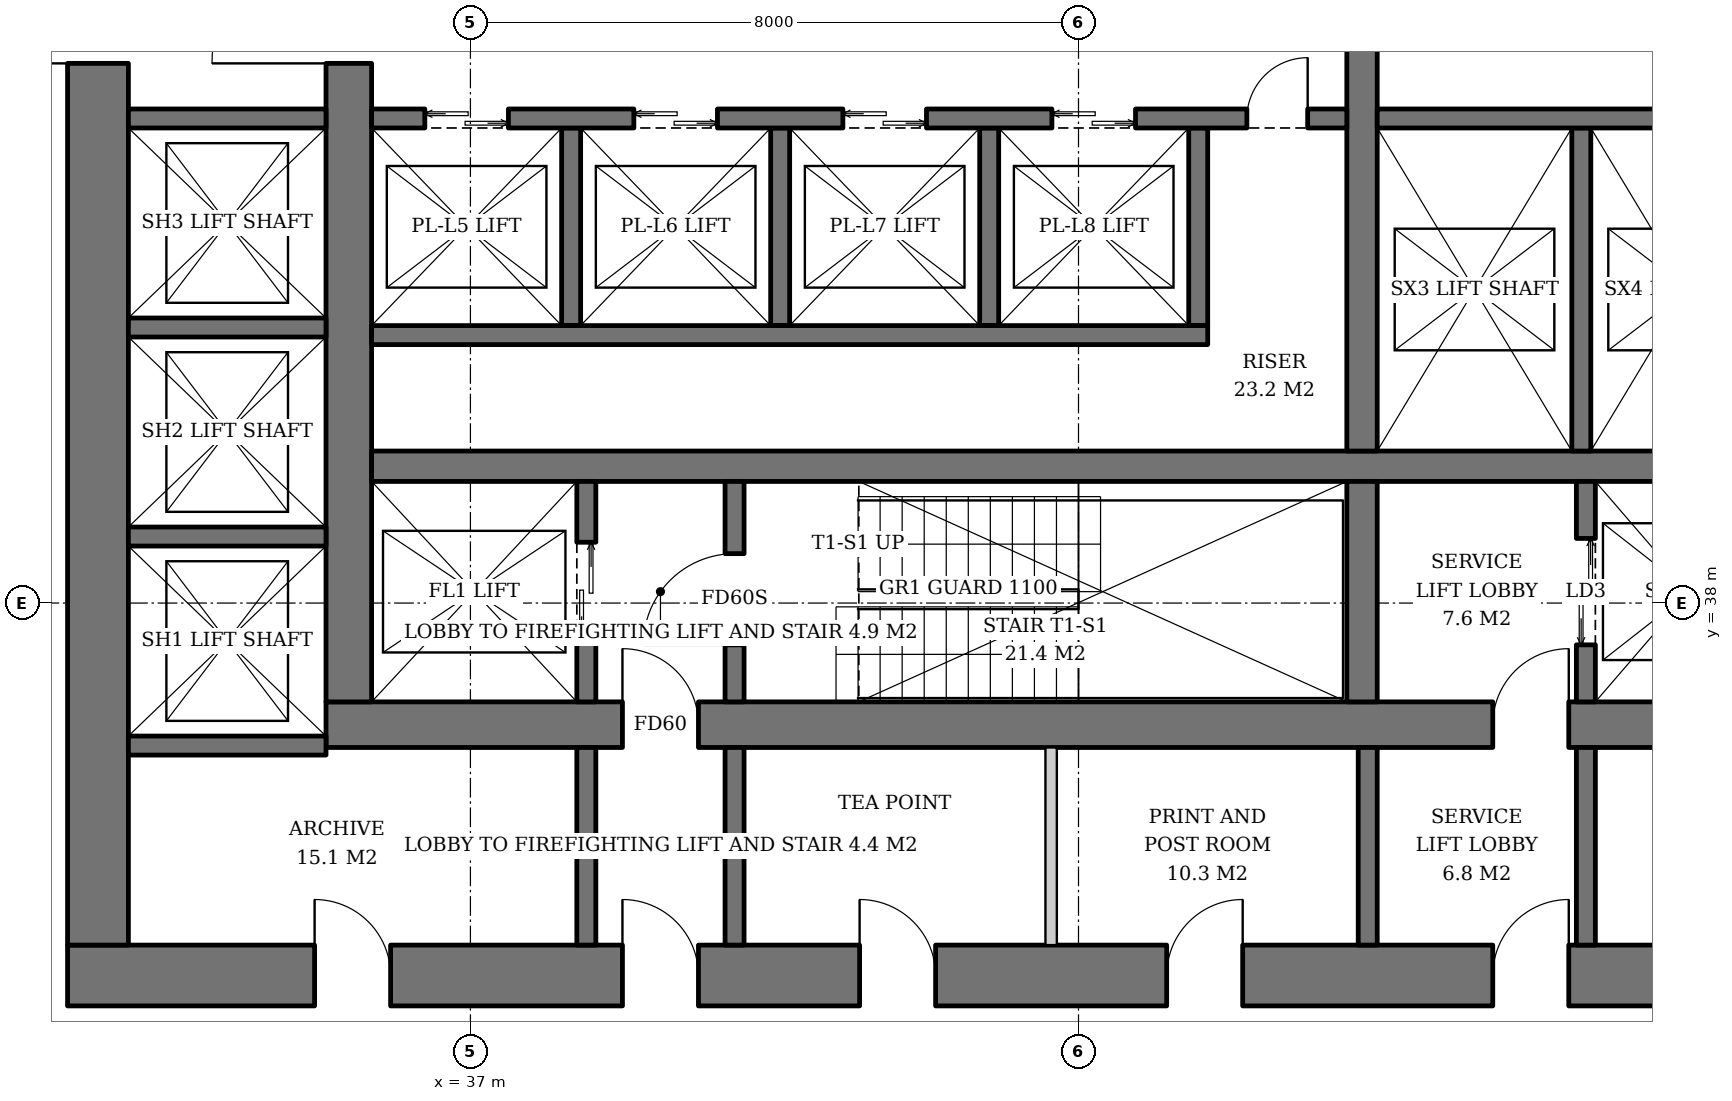
"""IFC4 building model, lengths in metres.
Left out: names, types, materials, properties, quantities, classifications, styles, units other than length and angle.
Written with IfcOpenShell. Run it as: python <this file> out.ifc"""

import sys

from ifc_helpers import new_model, si_unit, direction, frame, frame_2d, origin, place, context, subcontext, project, spatial, rectangle, extrude, element, fill, save


model = new_model("IFC4")
c1 = context("Model", 3, precision=1e-05, world=origin(), true_north=direction((0.0, 1.0)))
c2 = subcontext(c1, "Body", "Model", "MODEL_VIEW")
j1 = project(units=[si_unit("LENGTHUNIT", "METRE"), si_unit("PLANEANGLEUNIT", "RADIAN")], contexts=[c1])
p1 = place(None, origin())
s1 = spatial("IfcSite", under=j1, at=p1, CompositionType="ELEMENT")
p2 = place(p1, origin())
s2 = spatial("IfcBuilding", under=s1, at=p2, CompositionType="ELEMENT")
p3 = place(p2, frame((0.0, 0.0, 59.0)))
s3 = spatial("IfcBuildingStorey", under=s2, at=p3, CompositionType="ELEMENT", Elevation=59.0)
p4 = place(p3, frame((35.1, 36.4, 0.0), z_axis=(0.0, 0.0, 1.0), x_axis=(1.0, 0.0, 0.0)))
e1 = element("IfcWall", 1, at=p4, inside=s3, PredefinedType="SHEAR", context=c2, shape_type="SweptSolid", body=[
    extrude(rectangle(XDim=19.8, YDim=0.6, at=frame_2d((9.9, 0.0))), origin(), (0.0, 0.0, 1.0), 3.8),
])
p5 = place(p4, frame((3.9, 0.0, 0.0)))
e2 = element("IfcOpeningElement", 2, at=p5, cuts=e1, PredefinedType="OPENING", context=c2, shape_type="SweptSolid", body=[
    extrude(rectangle(XDim=1.0, YDim=2.1, at=frame_2d((0.5, 1.05))), frame((0.0, 0.31, 0.0), z_axis=(0.0, -1.0, 0.0), x_axis=(1.0, 0.0, 0.0)), (0.0, 0.0, 1.0), 0.62),
])
p6 = place(p4, frame((15.35, 0.0, 0.0)))
e3 = element("IfcOpeningElement", 3, at=p6, cuts=e1, PredefinedType="OPENING", context=c2, shape_type="SweptSolid", body=[
    extrude(rectangle(XDim=1.0, YDim=2.1, at=frame_2d((0.5, 1.05))), frame((0.0, 0.31, 0.0), z_axis=(0.0, -1.0, 0.0), x_axis=(1.0, 0.0, 0.0)), (0.0, 0.0, 1.0), 0.62),
])
p7 = place(p3, frame((35.4, 36.7, 0.0), z_axis=(0.0, 0.0, 1.0), x_axis=(0.0, 1.0, 0.0)))
e4 = element("IfcWall", 4, at=p7, inside=s3, PredefinedType="SHEAR", context=c2, shape_type="SweptSolid", body=[
    extrude(rectangle(XDim=18.6, YDim=0.6, at=frame_2d((9.3, 0.0))), origin(), (0.0, 0.0, 1.0), 3.8),
])
p8 = place(p7, frame((8.4, 0.0, 0.0)))
e5 = element("IfcOpeningElement", 5, at=p8, cuts=e4, PredefinedType="OPENING", context=c2, shape_type="SweptSolid", body=[
    extrude(rectangle(XDim=1.8, YDim=2.4, at=frame_2d((0.9, 1.2))), frame((0.0, 0.31, 0.0), z_axis=(0.0, -1.0, 0.0), x_axis=(1.0, 0.0, 0.0)), (0.0, 0.0, 1.0), 0.62),
])
p9 = place(p3, frame((31.7, 33.1, 0.0), z_axis=(0.0, 0.0, 1.0), x_axis=(1.0, 0.0, 0.0)))
e6 = element("IfcWall", 6, at=p9, inside=s3, PredefinedType="SHEAR", context=c2, shape_type="SweptSolid", body=[
    extrude(rectangle(XDim=26.6, YDim=0.8, at=frame_2d((13.3, 0.0))), origin(), (0.0, 0.0, 1.0), 3.8),
])
p10 = place(p9, frame((7.3, 0.0, 0.0)))
e7 = element("IfcOpeningElement", 7, at=p10, cuts=e6, PredefinedType="OPENING", context=c2, shape_type="SweptSolid", body=[
    extrude(rectangle(XDim=1.0, YDim=2.1, at=frame_2d((0.5, 1.05))), frame((0.0, 0.41, 0.0), z_axis=(0.0, -1.0, 0.0), x_axis=(1.0, 0.0, 0.0)), (0.0, 0.0, 1.0), 0.82),
])
p11 = place(p9, frame((18.75, 0.0, 0.0)))
e8 = element("IfcOpeningElement", 8, at=p11, cuts=e6, PredefinedType="OPENING", context=c2, shape_type="SweptSolid", body=[
    extrude(rectangle(XDim=1.0, YDim=2.1, at=frame_2d((0.5, 1.05))), frame((0.0, 0.41, 0.0), z_axis=(0.0, -1.0, 0.0), x_axis=(1.0, 0.0, 0.0)), (0.0, 0.0, 1.0), 0.82),
])
p12 = place(p9, frame((3.25, 0.0, 0.0)))
e9 = element("IfcOpeningElement", 9, at=p12, cuts=e6, PredefinedType="OPENING", context=c2, shape_type="SweptSolid", body=[
    extrude(rectangle(XDim=1.0, YDim=2.1, at=frame_2d((0.5, 1.05))), frame((0.0, 0.41, 0.0), z_axis=(0.0, -1.0, 0.0), x_axis=(1.0, 0.0, 0.0)), (0.0, 0.0, 1.0), 0.82),
])
p13 = place(p9, frame((10.42, 0.0, 0.0)))
e10 = element("IfcOpeningElement", 10, at=p13, cuts=e6, PredefinedType="OPENING", context=c2, shape_type="SweptSolid", body=[
    extrude(rectangle(XDim=1.0, YDim=2.1, at=frame_2d((0.5, 1.05))), frame((0.0, 0.41, 0.0), z_axis=(0.0, -1.0, 0.0), x_axis=(1.0, 0.0, 0.0)), (0.0, 0.0, 1.0), 0.82),
])
p14 = place(p9, frame((14.46, 0.0, 0.0)))
e11 = element("IfcOpeningElement", 11, at=p14, cuts=e6, PredefinedType="OPENING", context=c2, shape_type="SweptSolid", body=[
    extrude(rectangle(XDim=1.0, YDim=2.1, at=frame_2d((0.5, 1.05))), frame((0.0, 0.41, 0.0), z_axis=(0.0, -1.0, 0.0), x_axis=(1.0, 0.0, 0.0)), (0.0, 0.0, 1.0), 0.82),
])
p15 = place(p9, frame((22.45, 0.0, 0.0)))
e12 = element("IfcOpeningElement", 12, at=p15, cuts=e6, PredefinedType="OPENING", context=c2, shape_type="SweptSolid", body=[
    extrude(rectangle(XDim=1.0, YDim=2.1, at=frame_2d((0.5, 1.05))), frame((0.0, 0.41, 0.0), z_axis=(0.0, -1.0, 0.0), x_axis=(1.0, 0.0, 0.0)), (0.0, 0.0, 1.0), 0.82),
])
p16 = place(p3, frame((32.1, 33.5, 0.0), z_axis=(0.0, 0.0, 1.0), x_axis=(0.0, 1.0, 0.0)))
e13 = element("IfcWall", 13, at=p16, inside=s3, PredefinedType="SHEAR", context=c2, shape_type="SweptSolid", body=[
    extrude(rectangle(XDim=25.0, YDim=0.8, at=frame_2d((12.5, 0.0))), origin(), (0.0, 0.0, 1.0), 3.8),
])
p17 = place(p16, frame((11.6, 0.0, 0.0)))
e14 = element("IfcOpeningElement", 14, at=p17, cuts=e13, PredefinedType="OPENING", context=c2, shape_type="SweptSolid", body=[
    extrude(rectangle(XDim=1.8, YDim=2.4, at=frame_2d((0.9, 1.2))), frame((0.0, 0.41, 0.0), z_axis=(0.0, -1.0, 0.0), x_axis=(1.0, 0.0, 0.0)), (0.0, 0.0, 1.0), 0.82),
])
p18 = place(p3, frame((35.7, 39.8, 0.0), z_axis=(0.0, 0.0, 1.0), x_axis=(1.0, 0.0, 0.0)))
e15 = element("IfcWall", 15, at=p18, inside=s3, PredefinedType="SHEAR", context=c2, shape_type="SweptSolid", body=[
    extrude(rectangle(XDim=18.6, YDim=0.4, at=frame_2d((9.3, 0.0))), origin(), (0.0, 0.0, 1.0), 3.8),
])
p19 = place(p3, frame((48.73, 36.7, 0.0), z_axis=(0.0, 0.0, 1.0), x_axis=(0.0, 1.0, 0.0)))
e16 = element("IfcWall", 16, at=p19, inside=s3, PredefinedType="SHEAR", context=c2, shape_type="SweptSolid", body=[
    extrude(rectangle(XDim=2.9, YDim=0.4, at=frame_2d((1.45, 0.0))), origin(), (0.0, 0.0, 1.0), 3.8),
])
p20 = place(p3, frame((48.73, 40.0, 0.0), z_axis=(0.0, 0.0, 1.0), x_axis=(0.0, 1.0, 0.0)))
e17 = element("IfcWall", 17, at=p20, inside=s3, PredefinedType="SHEAR", context=c2, shape_type="SweptSolid", body=[
    extrude(rectangle(XDim=12.0, YDim=0.4, at=frame_2d((6.0, 0.0))), origin(), (0.0, 0.0, 1.0), 3.8),
])
p21 = place(p3, frame((38.525, 36.7, 0.0), z_axis=(0.0, 0.0, 1.0), x_axis=(0.0, 1.0, 0.0)))
e18 = element("IfcWall", 18, at=p21, inside=s3, PredefinedType="SHEAR", context=c2, shape_type="SweptSolid", body=[
    extrude(rectangle(XDim=2.9, YDim=0.25, at=frame_2d((1.45, 0.0))), origin(), (0.0, 0.0, 1.0), 3.8),
])
p22 = place(p21, frame((0.8, 0.0, 0.0)))
e19 = element("IfcOpeningElement", 19, at=p22, cuts=e18, PredefinedType="OPENING", context=c2, shape_type="SweptSolid", body=[
    extrude(rectangle(XDim=1.3, YDim=2.2, at=frame_2d((0.65, 1.1))), frame((0.0, 0.135, 0.0), z_axis=(0.0, -1.0, 0.0), x_axis=(1.0, 0.0, 0.0)), (0.0, 0.0, 1.0), 0.27),
])
p23 = place(p3, frame((40.475, 36.7, 0.0), z_axis=(0.0, 0.0, 1.0), x_axis=(0.0, 1.0, 0.0)))
e20 = element("IfcWall", 20, at=p23, inside=s3, PredefinedType="SHEAR", context=c2, shape_type="SweptSolid", body=[
    extrude(rectangle(XDim=2.9, YDim=0.25, at=frame_2d((1.45, 0.0))), origin(), (0.0, 0.0, 1.0), 3.8),
])
p24 = place(p23, frame((0.75, 0.0, 0.0)))
e21 = element("IfcOpeningElement", 21, at=p24, cuts=e20, PredefinedType="OPENING", context=c2, shape_type="SweptSolid", body=[
    extrude(rectangle(XDim=1.2, YDim=2.1, at=frame_2d((0.6, 1.05))), frame((0.0, 0.135, 0.0), z_axis=(0.0, -1.0, 0.0), x_axis=(1.0, 0.0, 0.0)), (0.0, 0.0, 1.0), 0.27),
])
p25 = place(p3, frame((51.675, 36.7, 0.0), z_axis=(0.0, 0.0, 1.0), x_axis=(0.0, 1.0, 0.0)))
e22 = element("IfcWall", 22, at=p25, inside=s3, PredefinedType="SHEAR", context=c2, shape_type="SweptSolid", body=[
    extrude(rectangle(XDim=2.9, YDim=0.25, at=frame_2d((1.45, 0.0))), origin(), (0.0, 0.0, 1.0), 3.8),
])
p26 = place(p25, frame((0.75, 0.0, 0.0)))
e23 = element("IfcOpeningElement", 23, at=p26, cuts=e22, PredefinedType="OPENING", context=c2, shape_type="SweptSolid", body=[
    extrude(rectangle(XDim=1.4, YDim=2.4, at=frame_2d((0.7, 1.2))), frame((0.0, 0.135, 0.0), z_axis=(0.0, -1.0, 0.0), x_axis=(1.0, 0.0, 0.0)), (0.0, 0.0, 1.0), 0.27),
])
for number, where, z_axis, x_axis in (
    (24, (38.325, 44.25, 0.0), (0.0, 0.0, 1.0), (0.0, -1.0, 0.0)),
    (25, (41.075, 44.25, 0.0), (0.0, 0.0, 1.0), (0.0, -1.0, 0.0)),
    (26, (43.825, 44.25, 0.0), (0.0, 0.0, 1.0), (0.0, -1.0, 0.0)),
    (27, (46.575, 44.25, 0.0), (0.0, 0.0, 1.0), (0.0, -1.0, 0.0)),
):
    element("IfcWall", number, at=place(p3, frame(where, z_axis=z_axis, x_axis=x_axis)), inside=s3, PredefinedType="SHEAR", context=c2, shape_type="SweptSolid", body=[
        extrude(rectangle(XDim=2.6, YDim=0.25, at=frame_2d((1.3, 0.0))), origin(), (0.0, 0.0, 1.0), 3.8),
    ])
p27 = place(p3, frame((35.7, 41.525, 0.0), z_axis=(0.0, 0.0, 1.0), x_axis=(1.0, 0.0, 0.0)))
e28 = element("IfcWall", 28, at=p27, inside=s3, PredefinedType="SHEAR", context=c2, shape_type="SweptSolid", body=[
    extrude(rectangle(XDim=11.0, YDim=0.25, at=frame_2d((5.5, 0.0))), origin(), (0.0, 0.0, 1.0), 3.8),
])
p28 = place(p3, frame((35.7, 44.375, 0.0), z_axis=(0.0, 0.0, 1.0), x_axis=(1.0, 0.0, 0.0)))
e29 = element("IfcWall", 29, at=p28, inside=s3, PredefinedType="SHEAR", context=c2, shape_type="SweptSolid", body=[
    extrude(rectangle(XDim=12.83, YDim=0.25, at=frame_2d((6.415, 0.0))), origin(), (0.0, 0.0, 1.0), 3.8),
])
p29 = place(p28, frame((0.7, 0.0, 0.0)))
e30 = element("IfcOpeningElement", 30, at=p29, cuts=e29, PredefinedType="OPENING", context=c2, shape_type="SweptSolid", body=[
    extrude(rectangle(XDim=1.1, YDim=2.2, at=frame_2d((0.55, 1.1))), frame((0.0, 0.135, 0.0), z_axis=(0.0, -1.0, 0.0), x_axis=(1.0, 0.0, 0.0)), (0.0, 0.0, 1.0), 0.27),
])
p30 = place(p28, frame((3.45, 0.0, 0.0)))
e31 = element("IfcOpeningElement", 31, at=p30, cuts=e29, PredefinedType="OPENING", context=c2, shape_type="SweptSolid", body=[
    extrude(rectangle(XDim=1.1, YDim=2.2, at=frame_2d((0.55, 1.1))), frame((0.0, 0.135, 0.0), z_axis=(0.0, -1.0, 0.0), x_axis=(1.0, 0.0, 0.0)), (0.0, 0.0, 1.0), 0.27),
])
p31 = place(p28, frame((6.2, 0.0, 0.0)))
e32 = element("IfcOpeningElement", 32, at=p31, cuts=e29, PredefinedType="OPENING", context=c2, shape_type="SweptSolid", body=[
    extrude(rectangle(XDim=1.1, YDim=2.2, at=frame_2d((0.55, 1.1))), frame((0.0, 0.135, 0.0), z_axis=(0.0, -1.0, 0.0), x_axis=(1.0, 0.0, 0.0)), (0.0, 0.0, 1.0), 0.27),
])
p32 = place(p28, frame((8.95, 0.0, 0.0)))
e33 = element("IfcOpeningElement", 33, at=p32, cuts=e29, PredefinedType="OPENING", context=c2, shape_type="SweptSolid", body=[
    extrude(rectangle(XDim=1.1, YDim=2.2, at=frame_2d((0.55, 1.1))), frame((0.0, 0.135, 0.0), z_axis=(0.0, -1.0, 0.0), x_axis=(1.0, 0.0, 0.0)), (0.0, 0.0, 1.0), 0.27),
])
p33 = place(p28, frame((11.515, 0.0, 0.0)))
e34 = element("IfcOpeningElement", 34, at=p33, cuts=e29, PredefinedType="OPENING", context=c2, shape_type="SweptSolid", body=[
    extrude(rectangle(XDim=0.8, YDim=2.0, at=frame_2d((0.4, 1.0))), frame((0.0, 0.135, 0.0), z_axis=(0.0, -1.0, 0.0), x_axis=(1.0, 0.0, 0.0)), (0.0, 0.0, 1.0), 0.27),
])
p34 = place(p3, frame((51.615, 44.25, 0.0), z_axis=(0.0, 0.0, 1.0), x_axis=(0.0, -1.0, 0.0)))
e35 = element("IfcWall", 35, at=p34, inside=s3, PredefinedType="SHEAR", context=c2, shape_type="SweptSolid", body=[
    extrude(rectangle(XDim=4.25, YDim=0.25, at=frame_2d((2.125, 0.0))), origin(), (0.0, 0.0, 1.0), 3.8),
])
p35 = place(p3, frame((48.93, 44.375, 0.0), z_axis=(0.0, 0.0, 1.0), x_axis=(1.0, 0.0, 0.0)))
e36 = element("IfcWall", 36, at=p35, inside=s3, PredefinedType="SHEAR", context=c2, shape_type="SweptSolid", body=[
    extrude(rectangle(XDim=5.37, YDim=0.25, at=frame_2d((2.685, 0.0))), origin(), (0.0, 0.0, 1.0), 3.8),
])
for number, where, z_axis, x_axis in (
    (37, (32.5, 36.125, 0.0), (0.0, 0.0, 1.0), (1.0, 0.0, 0.0)),
    (38, (32.5, 38.875, 0.0), (0.0, 0.0, 1.0), (1.0, 0.0, 0.0)),
    (39, (32.5, 41.625, 0.0), (0.0, 0.0, 1.0), (1.0, 0.0, 0.0)),
    (40, (32.5, 44.375, 0.0), (0.0, 0.0, 1.0), (1.0, 0.0, 0.0)),
):
    element("IfcWall", number, at=place(p3, frame(where, z_axis=z_axis, x_axis=x_axis)), inside=s3, PredefinedType="SHEAR", context=c2, shape_type="SweptSolid", body=[
        extrude(rectangle(XDim=2.6, YDim=0.25, at=frame_2d((1.3, 0.0))), origin(), (0.0, 0.0, 1.0), 3.8),
    ])
for number, where, z_axis, x_axis in (
    (41, (38.525, 33.5, 0.0), (0.0, 0.0, 1.0), (0.0, 1.0, 0.0)),
    (42, (40.475, 33.5, 0.0), (0.0, 0.0, 1.0), (0.0, 1.0, 0.0)),
    (43, (48.805, 33.5, 0.0), (0.0, 0.0, 1.0), (0.0, 1.0, 0.0)),
    (44, (51.675, 33.5, 0.0), (0.0, 0.0, 1.0), (0.0, 1.0, 0.0)),
):
    element("IfcWall", number, at=place(p3, frame(where, z_axis=z_axis, x_axis=x_axis)), inside=s3, PredefinedType="SOLIDWALL", context=c2, shape_type="SweptSolid", body=[
        extrude(rectangle(XDim=2.6, YDim=0.25, at=frame_2d((1.3, 0.0))), origin(), (0.0, 0.0, 1.0), 3.62),
    ])
p36 = place(p3, frame((44.64, 33.5, 0.0), z_axis=(0.0, 0.0, 1.0), x_axis=(0.0, 1.0, 0.0)))
e45 = element("IfcWall", 45, at=p36, inside=s3, PredefinedType="SOLIDWALL", context=c2, shape_type="SweptSolid", body=[
    extrude(rectangle(XDim=2.6, YDim=0.15, at=frame_2d((1.3, 0.0))), origin(), (0.0, 0.0, 1.0), 3.62),
])
p37 = place(p22, origin())
e46 = element("IfcDoor", 46, at=p37, inside=s3, OperationType="DOUBLE_DOOR_SLIDING", PredefinedType="DOOR", context=c2, shape_type="SweptSolid", body=[
    extrude(rectangle(XDim=1.3, YDim=2.2, at=frame_2d((0.65, 1.1))), frame((0.0, 0.025, 0.0), z_axis=(0.0, -1.0, 0.0), x_axis=(1.0, 0.0, 0.0)), (0.0, 0.0, 1.0), 0.05),
])
fill(e19, e46)
p38 = place(p24, origin())
e47 = element("IfcDoor", 47, at=p38, inside=s3, OperationType="SINGLE_SWING_LEFT", PredefinedType="DOOR", context=c2, shape_type="SweptSolid", body=[
    extrude(rectangle(XDim=1.2, YDim=2.1, at=frame_2d((0.6, 1.05))), frame((0.0, 0.025, 0.0), z_axis=(0.0, -1.0, 0.0), x_axis=(1.0, 0.0, 0.0)), (0.0, 0.0, 1.0), 0.05),
])
fill(e21, e47)
p39 = place(p26, origin())
e48 = element("IfcDoor", 48, at=p39, inside=s3, OperationType="DOUBLE_DOOR_SLIDING", PredefinedType="DOOR", context=c2, shape_type="SweptSolid", body=[
    extrude(rectangle(XDim=1.4, YDim=2.4, at=frame_2d((0.7, 1.2))), frame((0.0, 0.025, 0.0), z_axis=(0.0, -1.0, 0.0), x_axis=(1.0, 0.0, 0.0)), (0.0, 0.0, 1.0), 0.05),
])
fill(e23, e48)
p40 = place(p29, origin())
e49 = element("IfcDoor", 49, at=p40, inside=s3, OperationType="DOUBLE_DOOR_SLIDING", PredefinedType="DOOR", context=c2, shape_type="SweptSolid", body=[
    extrude(rectangle(XDim=1.1, YDim=2.2, at=frame_2d((0.55, 1.1))), frame((0.0, 0.025, 0.0), z_axis=(0.0, -1.0, 0.0), x_axis=(1.0, 0.0, 0.0)), (0.0, 0.0, 1.0), 0.05),
])
fill(e30, e49)
p41 = place(p30, origin())
e50 = element("IfcDoor", 50, at=p41, inside=s3, OperationType="DOUBLE_DOOR_SLIDING", PredefinedType="DOOR", context=c2, shape_type="SweptSolid", body=[
    extrude(rectangle(XDim=1.1, YDim=2.2, at=frame_2d((0.55, 1.1))), frame((0.0, 0.025, 0.0), z_axis=(0.0, -1.0, 0.0), x_axis=(1.0, 0.0, 0.0)), (0.0, 0.0, 1.0), 0.05),
])
fill(e31, e50)
p42 = place(p31, origin())
e51 = element("IfcDoor", 51, at=p42, inside=s3, OperationType="DOUBLE_DOOR_SLIDING", PredefinedType="DOOR", context=c2, shape_type="SweptSolid", body=[
    extrude(rectangle(XDim=1.1, YDim=2.2, at=frame_2d((0.55, 1.1))), frame((0.0, 0.025, 0.0), z_axis=(0.0, -1.0, 0.0), x_axis=(1.0, 0.0, 0.0)), (0.0, 0.0, 1.0), 0.05),
])
fill(e32, e51)
p43 = place(p32, origin())
e52 = element("IfcDoor", 52, at=p43, inside=s3, OperationType="DOUBLE_DOOR_SLIDING", PredefinedType="DOOR", context=c2, shape_type="SweptSolid", body=[
    extrude(rectangle(XDim=1.1, YDim=2.2, at=frame_2d((0.55, 1.1))), frame((0.0, 0.025, 0.0), z_axis=(0.0, -1.0, 0.0), x_axis=(1.0, 0.0, 0.0)), (0.0, 0.0, 1.0), 0.05),
])
fill(e33, e52)
p44 = place(p33, origin())
e53 = element("IfcDoor", 53, at=p44, inside=s3, OperationType="SINGLE_SWING_RIGHT", PredefinedType="DOOR", context=c2, shape_type="SweptSolid", body=[
    extrude(rectangle(XDim=0.8, YDim=2.0, at=frame_2d((0.4, 1.0))), frame((0.0, 0.025, 0.0), z_axis=(0.0, -1.0, 0.0), x_axis=(1.0, 0.0, 0.0)), (0.0, 0.0, 1.0), 0.05),
])
fill(e34, e53)
p45 = place(p5, origin())
e54 = element("IfcDoor", 54, at=p45, inside=s3, OperationType="SINGLE_SWING_LEFT", PredefinedType="DOOR", context=c2, shape_type="SweptSolid", body=[
    extrude(rectangle(XDim=1.0, YDim=2.1, at=frame_2d((0.5, 1.05))), frame((0.0, 0.025, 0.0), z_axis=(0.0, -1.0, 0.0), x_axis=(1.0, 0.0, 0.0)), (0.0, 0.0, 1.0), 0.05),
])
fill(e2, e54)
p46 = place(p8, origin())
e55 = element("IfcDoor", 55, at=p46, inside=s3, OperationType="DOUBLE_DOOR_SINGLE_SWING", PredefinedType="DOOR", context=c2, shape_type="SweptSolid", body=[
    extrude(rectangle(XDim=1.8, YDim=2.4, at=frame_2d((0.9, 1.2))), frame((0.0, 0.025, 0.0), z_axis=(0.0, -1.0, 0.0), x_axis=(1.0, 0.0, 0.0)), (0.0, 0.0, 1.0), 0.05),
])
fill(e5, e55)
p47 = place(p6, origin())
e56 = element("IfcDoor", 56, at=p47, inside=s3, OperationType="SINGLE_SWING_RIGHT", PredefinedType="DOOR", context=c2, shape_type="SweptSolid", body=[
    extrude(rectangle(XDim=1.0, YDim=2.1, at=frame_2d((0.5, 1.05))), frame((0.0, 0.025, 0.0), z_axis=(0.0, -1.0, 0.0), x_axis=(1.0, 0.0, 0.0)), (0.0, 0.0, 1.0), 0.05),
])
fill(e3, e56)
p48 = place(p17, origin())
e57 = element("IfcDoor", 57, at=p48, inside=s3, OperationType="DOUBLE_DOOR_SINGLE_SWING", PredefinedType="DOOR", context=c2, shape_type="SweptSolid", body=[
    extrude(rectangle(XDim=1.8, YDim=2.4, at=frame_2d((0.9, 1.2))), frame((0.0, 0.025, 0.0), z_axis=(0.0, -1.0, 0.0), x_axis=(1.0, 0.0, 0.0)), (0.0, 0.0, 1.0), 0.05),
])
fill(e14, e57)
p49 = place(p10, origin())
e58 = element("IfcDoor", 58, at=p49, inside=s3, OperationType="SINGLE_SWING_LEFT", PredefinedType="DOOR", context=c2, shape_type="SweptSolid", body=[
    extrude(rectangle(XDim=1.0, YDim=2.1, at=frame_2d((0.5, 1.05))), frame((0.0, 0.025, 0.0), z_axis=(0.0, -1.0, 0.0), x_axis=(1.0, 0.0, 0.0)), (0.0, 0.0, 1.0), 0.05),
])
fill(e7, e58)
p50 = place(p11, origin())
e59 = element("IfcDoor", 59, at=p50, inside=s3, OperationType="SINGLE_SWING_RIGHT", PredefinedType="DOOR", context=c2, shape_type="SweptSolid", body=[
    extrude(rectangle(XDim=1.0, YDim=2.1, at=frame_2d((0.5, 1.05))), frame((0.0, 0.025, 0.0), z_axis=(0.0, -1.0, 0.0), x_axis=(1.0, 0.0, 0.0)), (0.0, 0.0, 1.0), 0.05),
])
fill(e8, e59)
p51 = place(p12, origin())
e60 = element("IfcDoor", 60, at=p51, inside=s3, OperationType="SINGLE_SWING_LEFT", PredefinedType="DOOR", context=c2, shape_type="SweptSolid", body=[
    extrude(rectangle(XDim=1.0, YDim=2.1, at=frame_2d((0.5, 1.05))), frame((0.0, 0.39, 0.0), z_axis=(0.0, -1.0, 0.0), x_axis=(1.0, 0.0, 0.0)), (0.0, 0.0, 1.0), 0.05),
])
fill(e9, e60)
p52 = place(p13, origin())
e61 = element("IfcDoor", 61, at=p52, inside=s3, OperationType="SINGLE_SWING_LEFT", PredefinedType="DOOR", context=c2, shape_type="SweptSolid", body=[
    extrude(rectangle(XDim=1.0, YDim=2.1, at=frame_2d((0.5, 1.05))), frame((0.0, 0.39, 0.0), z_axis=(0.0, -1.0, 0.0), x_axis=(1.0, 0.0, 0.0)), (0.0, 0.0, 1.0), 0.05),
])
fill(e10, e61)
p53 = place(p14, origin())
e62 = element("IfcDoor", 62, at=p53, inside=s3, OperationType="SINGLE_SWING_RIGHT", PredefinedType="DOOR", context=c2, shape_type="SweptSolid", body=[
    extrude(rectangle(XDim=1.0, YDim=2.1, at=frame_2d((0.5, 1.05))), frame((0.0, 0.39, 0.0), z_axis=(0.0, -1.0, 0.0), x_axis=(1.0, 0.0, 0.0)), (0.0, 0.0, 1.0), 0.05),
])
fill(e11, e62)
save(model, sys.argv[1])
